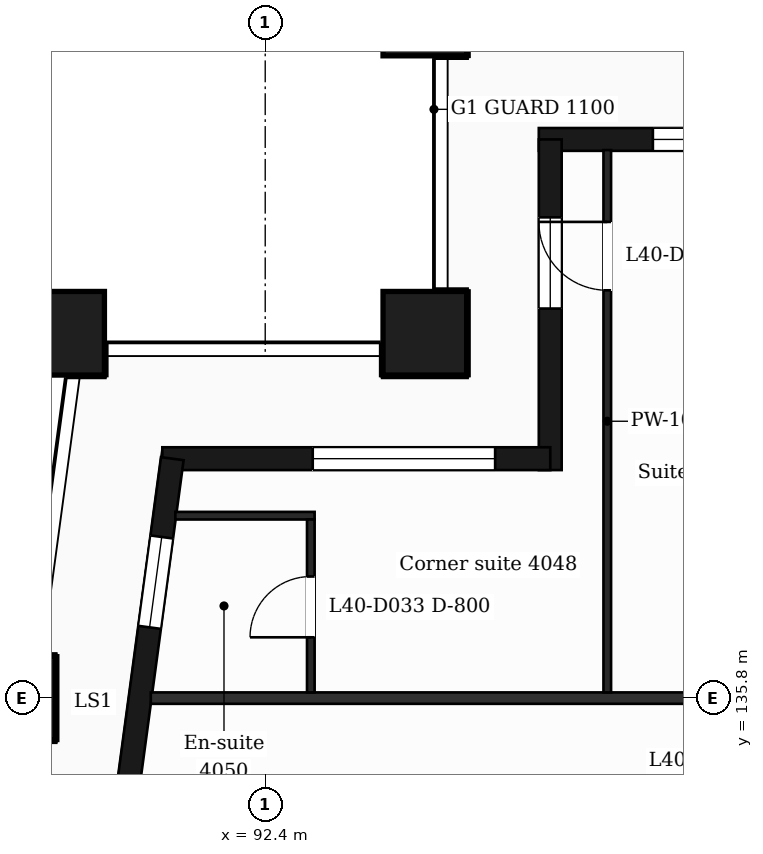
"""IFC4 building model, lengths in metres.
Left out: names, types, materials, properties, quantities, classifications, styles, units other than length and angle.
Written with IfcOpenShell. Run it as: python <this file> out.ifc"""

import sys

from ifc_helpers import new_model, si_unit, direction, frame, frame_2d, origin, origin_2d, place, context, subcontext, project, spatial, rectangle, extrude, element, fill, save


model = new_model("IFC4")
c1 = context("Model", 3, precision=1e-05, world=origin(), true_north=direction((0.0, 1.0)))
c2 = subcontext(c1, "Body", "Model", "MODEL_VIEW")
j1 = project(units=[si_unit("LENGTHUNIT", "METRE"), si_unit("PLANEANGLEUNIT", "RADIAN")], contexts=[c1])
p1 = place(None, origin())
s1 = spatial("IfcSite", under=j1, at=p1, CompositionType="ELEMENT")
p2 = place(p1, origin())
s2 = spatial("IfcBuilding", under=s1, at=p2, CompositionType="ELEMENT")
p3 = place(p2, frame((0.0, 0.0, 170.0)))
s3 = spatial("IfcBuildingStorey", under=s2, at=p3, CompositionType="ELEMENT", Elevation=170.0)
for number, where, z_axis, x_axis in (
    (1, (94.5, 140.6, 0.0), (0.0, 0.0, 1.0), (1.0, 0.0, 0.0)),
    (2, (89.735, 140.6, 0.0), (0.0, 0.0, 1.0), (1.0, 0.0, 0.0)),
    (3, (89.088, 135.8, 0.0), (0.0, 0.0, 1.0), (1.0, 0.0, 0.0)),
    (4, (94.5, 144.8, 0.0), (0.0, 0.0, 1.0), (1.0, 0.0, 0.0)),
):
    element("IfcColumn", number, at=place(p3, frame(where, z_axis=z_axis, x_axis=x_axis)), inside=s3, PredefinedType="COLUMN", context=c2, shape_type="SweptSolid", body=[
        extrude(rectangle(XDim=1.1, YDim=1.1, at=origin_2d()), origin(), (0.0, 0.0, 1.0), 3.7),
    ])
p4 = place(p3, frame((110.4, 143.15, 0.0), z_axis=(0.0, 0.0, 1.0), x_axis=(-1.0, 0.0, 0.0)))
e5 = element("IfcWall", 5, at=p4, inside=s3, PredefinedType="SOLIDWALL", context=c2, shape_type="SweptSolid", body=[
    extrude(rectangle(XDim=14.4, YDim=0.3, at=frame_2d((7.2, 0.0))), origin(), (0.0, 0.0, 1.0), 3.38),
])
p5 = place(p4, frame((2.7, 0.0, 0.9)))
e6 = element("IfcOpeningElement", 6, at=p5, cuts=e5, PredefinedType="OPENING", context=c2, shape_type="SweptSolid", body=[
    extrude(rectangle(XDim=1.2, YDim=2.1, at=frame_2d((0.6, 1.05))), frame((0.0, 0.16, 0.0), z_axis=(0.0, -1.0, 0.0), x_axis=(1.0, 0.0, 0.0)), (0.0, 0.0, 1.0), 0.32),
])
p6 = place(p4, frame((6.9, 0.0, 0.0)))
e7 = element("IfcOpeningElement", 7, at=p6, cuts=e5, PredefinedType="OPENING", context=c2, shape_type="SweptSolid", body=[
    extrude(rectangle(XDim=1.2, YDim=2.4, at=frame_2d((0.6, 1.2))), frame((0.0, 0.16, 0.0), z_axis=(0.0, -1.0, 0.0), x_axis=(1.0, 0.0, 0.0)), (0.0, 0.0, 1.0), 0.32),
])
p7 = place(p4, frame((10.5, 0.0, 0.9)))
e8 = element("IfcOpeningElement", 8, at=p7, cuts=e5, PredefinedType="OPENING", context=c2, shape_type="SweptSolid", body=[
    extrude(rectangle(XDim=2.4, YDim=2.1, at=frame_2d((1.2, 1.05))), frame((0.0, 0.16, 0.0), z_axis=(0.0, -1.0, 0.0), x_axis=(1.0, 0.0, 0.0)), (0.0, 0.0, 1.0), 0.32),
])
p8 = place(p3, frame((96.15, 143.15, 0.0), z_axis=(0.0, 0.0, 1.0), x_axis=(0.0, -1.0, 0.0)))
e9 = element("IfcWall", 9, at=p8, inside=s3, PredefinedType="SOLIDWALL", context=c2, shape_type="SweptSolid", body=[
    extrude(rectangle(XDim=4.35, YDim=0.3, at=frame_2d((2.175, 0.0))), origin(), (0.0, 0.0, 1.0), 3.38),
])
p9 = place(p8, frame((1.025, 0.0, 0.9)))
e10 = element("IfcOpeningElement", 10, at=p9, cuts=e9, PredefinedType="OPENING", context=c2, shape_type="SweptSolid", body=[
    extrude(rectangle(XDim=1.2, YDim=2.1, at=frame_2d((0.6, 1.05))), frame((0.0, 0.16, 0.0), z_axis=(0.0, -1.0, 0.0), x_axis=(1.0, 0.0, 0.0)), (0.0, 0.0, 1.0), 0.32),
])
p10 = place(p3, frame((96.15, 138.95, 0.0), z_axis=(0.0, 0.0, 1.0), x_axis=(-1.0, 0.0, 0.0)))
e11 = element("IfcWall", 11, at=p10, inside=s3, PredefinedType="SOLIDWALL", context=c2, shape_type="SweptSolid", body=[
    extrude(rectangle(XDim=5.104, YDim=0.3, at=frame_2d((2.552, 0.0))), origin(), (0.0, 0.0, 1.0), 3.38),
])
p11 = place(p10, frame((0.725, 0.0, 0.9)))
e12 = element("IfcOpeningElement", 12, at=p11, cuts=e11, PredefinedType="OPENING", context=c2, shape_type="SweptSolid", body=[
    extrude(rectangle(XDim=2.4, YDim=2.1, at=frame_2d((1.2, 1.05))), frame((0.0, 0.16, 0.0), z_axis=(0.0, -1.0, 0.0), x_axis=(1.0, 0.0, 0.0)), (0.0, 0.0, 1.0), 0.32),
])
p12 = place(p3, frame((91.177, 138.95, 0.0), z_axis=(0.0, 0.0, 1.0), x_axis=(-0.133426664613, -0.991058689065, 0.0)))
e13 = element("IfcWall", 13, at=p12, inside=s3, PredefinedType="SOLIDWALL", context=c2, shape_type="SweptSolid", body=[
    extrude(rectangle(XDim=6.609, YDim=0.3, at=frame_2d((3.305, 0.0))), origin(), (0.0, 0.0, 1.0), 3.38),
])
p13 = place(p12, frame((1.039, 0.0, 0.9)))
e14 = element("IfcOpeningElement", 14, at=p13, cuts=e13, PredefinedType="OPENING", context=c2, shape_type="SweptSolid", body=[
    extrude(rectangle(XDim=1.2, YDim=2.1, at=frame_2d((0.6, 1.05))), frame((0.0, 0.16, 0.0), z_axis=(0.0, -1.0, 0.0), x_axis=(1.0, 0.0, 0.0)), (0.0, 0.0, 1.0), 0.32),
])
p14 = place(p12, frame((4.294, 0.0, 0.0)))
e15 = element("IfcOpeningElement", 15, at=p14, cuts=e13, PredefinedType="OPENING", context=c2, shape_type="SweptSolid", body=[
    extrude(rectangle(XDim=1.2, YDim=2.4, at=frame_2d((0.6, 1.2))), frame((0.0, 0.16, 0.0), z_axis=(0.0, -1.0, 0.0), x_axis=(1.0, 0.0, 0.0)), (0.0, 0.0, 1.0), 0.32),
])
p15 = place(p3, frame((90.895, 135.8, 0.0), z_axis=(0.0, 0.0, 1.0), x_axis=(1.0, 0.0, 0.0)))
e16 = element("IfcWall", 16, at=p15, inside=s3, PredefinedType="PARTITIONING", context=c2, shape_type="SweptSolid", body=[
    extrude(rectangle(XDim=45.011, YDim=0.15, at=frame_2d((22.505, 0.0))), origin(), (0.0, 0.0, 1.0), 3.38),
])
p16 = place(p15, frame((7.675, 0.0, 0.0)))
e17 = element("IfcOpeningElement", 17, at=p16, cuts=e16, PredefinedType="OPENING", context=c2, shape_type="SweptSolid", body=[
    extrude(rectangle(XDim=1.0, YDim=2.1, at=frame_2d((0.5, 1.05))), frame((0.0, 0.085, 0.0), z_axis=(0.0, -1.0, 0.0), x_axis=(1.0, 0.0, 0.0)), (0.0, 0.0, 1.0), 0.17),
])
p17 = place(p15, frame((11.505, 0.0, 0.0)))
e18 = element("IfcOpeningElement", 18, at=p17, cuts=e16, PredefinedType="OPENING", context=c2, shape_type="SweptSolid", body=[
    extrude(rectangle(XDim=1.0, YDim=2.1, at=frame_2d((0.5, 1.05))), frame((0.0, 0.085, 0.0), z_axis=(0.0, -1.0, 0.0), x_axis=(1.0, 0.0, 0.0)), (0.0, 0.0, 1.0), 0.17),
])
p18 = place(p15, frame((24.865, 0.0, 0.0)))
e19 = element("IfcOpeningElement", 19, at=p18, cuts=e16, PredefinedType="OPENING", context=c2, shape_type="SweptSolid", body=[
    extrude(rectangle(XDim=1.0, YDim=2.1, at=frame_2d((0.5, 1.05))), frame((0.0, 0.085, 0.0), z_axis=(0.0, -1.0, 0.0), x_axis=(1.0, 0.0, 0.0)), (0.0, 0.0, 1.0), 0.17),
])
p19 = place(p15, frame((31.18, 0.0, 0.0)))
e20 = element("IfcOpeningElement", 20, at=p19, cuts=e16, PredefinedType="OPENING", context=c2, shape_type="SweptSolid", body=[
    extrude(rectangle(XDim=0.95, YDim=2.1, at=frame_2d((0.475, 1.05))), frame((0.0, 0.085, 0.0), z_axis=(0.0, -1.0, 0.0), x_axis=(1.0, 0.0, 0.0)), (0.0, 0.0, 1.0), 0.17),
])
p20 = place(p15, frame((39.814, 0.0, 0.0)))
e21 = element("IfcOpeningElement", 21, at=p20, cuts=e16, PredefinedType="OPENING", context=c2, shape_type="SweptSolid", body=[
    extrude(rectangle(XDim=0.95, YDim=2.1, at=frame_2d((0.475, 1.05))), frame((0.0, 0.085, 0.0), z_axis=(0.0, -1.0, 0.0), x_axis=(1.0, 0.0, 0.0)), (0.0, 0.0, 1.0), 0.17),
])
p21 = place(p3, frame((91.218, 138.2, 0.0), z_axis=(0.0, 0.0, 1.0), x_axis=(1.0, 0.0, 0.0)))
e22 = element("IfcWall", 22, at=p21, inside=s3, PredefinedType="PARTITIONING", context=c2, shape_type="SweptSolid", body=[
    extrude(rectangle(XDim=1.832, YDim=0.1, at=frame_2d((0.916, 0.0))), origin(), (0.0, 0.0, 1.0), 3.38),
])
p22 = place(p3, frame((93.0, 135.875, 0.0), z_axis=(0.0, 0.0, 1.0), x_axis=(0.0, 1.0, 0.0)))
e23 = element("IfcWall", 23, at=p22, inside=s3, PredefinedType="PARTITIONING", context=c2, shape_type="SweptSolid", body=[
    extrude(rectangle(XDim=2.275, YDim=0.1, at=frame_2d((1.137, 0.0))), origin(), (0.0, 0.0, 1.0), 3.38),
])
p23 = place(p22, frame((0.725, 0.0, 0.0)))
e24 = element("IfcOpeningElement", 24, at=p23, cuts=e23, PredefinedType="OPENING", context=c2, shape_type="SweptSolid", body=[
    extrude(rectangle(XDim=0.8, YDim=2.1, at=frame_2d((0.4, 1.05))), frame((0.0, 0.06, 0.0), z_axis=(0.0, -1.0, 0.0), x_axis=(1.0, 0.0, 0.0)), (0.0, 0.0, 1.0), 0.12),
])
p24 = place(p3, frame((96.9, 135.875, 0.0), z_axis=(0.0, 0.0, 1.0), x_axis=(0.0, 1.0, 0.0)))
e25 = element("IfcWall", 25, at=p24, inside=s3, PredefinedType="PARTITIONING", context=c2, shape_type="SweptSolid", body=[
    extrude(rectangle(XDim=7.135, YDim=0.1, at=frame_2d((3.567, 0.0))), origin(), (0.0, 0.0, 1.0), 3.38),
])
p25 = place(p24, frame((5.29, 0.0, 0.0)))
e26 = element("IfcOpeningElement", 26, at=p25, cuts=e25, PredefinedType="OPENING", context=c2, shape_type="SweptSolid", body=[
    extrude(rectangle(XDim=0.9, YDim=2.1, at=frame_2d((0.45, 1.05))), frame((0.0, 0.06, 0.0), z_axis=(0.0, -1.0, 0.0), x_axis=(1.0, 0.0, 0.0)), (0.0, 0.0, 1.0), 0.12),
])
p26 = place(p7, origin())
e27 = element("IfcWindow", 27, at=p26, inside=s3, PartitioningType="SINGLE_PANEL", PredefinedType="WINDOW", context=c2, shape_type="SweptSolid", body=[
    extrude(rectangle(XDim=2.4, YDim=2.1, at=frame_2d((1.2, 1.05))), frame((0.0, 0.03, 0.0), z_axis=(0.0, -1.0, 0.0), x_axis=(1.0, 0.0, 0.0)), (0.0, 0.0, 1.0), 0.06),
])
fill(e8, e27)
p27 = place(p9, origin())
e28 = element("IfcWindow", 28, at=p27, inside=s3, PartitioningType="SINGLE_PANEL", PredefinedType="WINDOW", context=c2, shape_type="SweptSolid", body=[
    extrude(rectangle(XDim=1.2, YDim=2.1, at=frame_2d((0.6, 1.05))), frame((0.0, 0.03, 0.0), z_axis=(0.0, -1.0, 0.0), x_axis=(1.0, 0.0, 0.0)), (0.0, 0.0, 1.0), 0.06),
])
fill(e10, e28)
p28 = place(p11, origin())
e29 = element("IfcWindow", 29, at=p28, inside=s3, PartitioningType="SINGLE_PANEL", PredefinedType="WINDOW", context=c2, shape_type="SweptSolid", body=[
    extrude(rectangle(XDim=2.4, YDim=2.1, at=frame_2d((1.2, 1.05))), frame((0.0, 0.03, 0.0), z_axis=(0.0, -1.0, 0.0), x_axis=(1.0, 0.0, 0.0)), (0.0, 0.0, 1.0), 0.06),
])
fill(e12, e29)
p29 = place(p13, origin())
e30 = element("IfcWindow", 30, at=p29, inside=s3, PartitioningType="SINGLE_PANEL", PredefinedType="WINDOW", context=c2, shape_type="SweptSolid", body=[
    extrude(rectangle(XDim=1.2, YDim=2.1, at=frame_2d((0.6, 1.05))), frame((0.0, 0.03, 0.0), z_axis=(0.0, -1.0, 0.0), x_axis=(1.0, 0.0, 0.0)), (0.0, 0.0, 1.0), 0.06),
])
fill(e14, e30)
p30 = place(p25, origin())
e31 = element("IfcDoor", 31, at=p30, inside=s3, OperationType="SINGLE_SWING_RIGHT", PredefinedType="DOOR", context=c2, shape_type="SweptSolid", body=[
    extrude(rectangle(XDim=0.9, YDim=2.1, at=frame_2d((0.45, 1.05))), frame((0.0, 0.025, 0.0), z_axis=(0.0, -1.0, 0.0), x_axis=(1.0, 0.0, 0.0)), (0.0, 0.0, 1.0), 0.05),
])
fill(e26, e31)
p31 = place(p23, origin())
e32 = element("IfcDoor", 32, at=p31, inside=s3, OperationType="SINGLE_SWING_LEFT", PredefinedType="DOOR", context=c2, shape_type="SweptSolid", body=[
    extrude(rectangle(XDim=0.8, YDim=2.1, at=frame_2d((0.4, 1.05))), frame((0.0, 0.025, 0.0), z_axis=(0.0, -1.0, 0.0), x_axis=(1.0, 0.0, 0.0)), (0.0, 0.0, 1.0), 0.05),
])
fill(e24, e32)
save(model, sys.argv[1])
